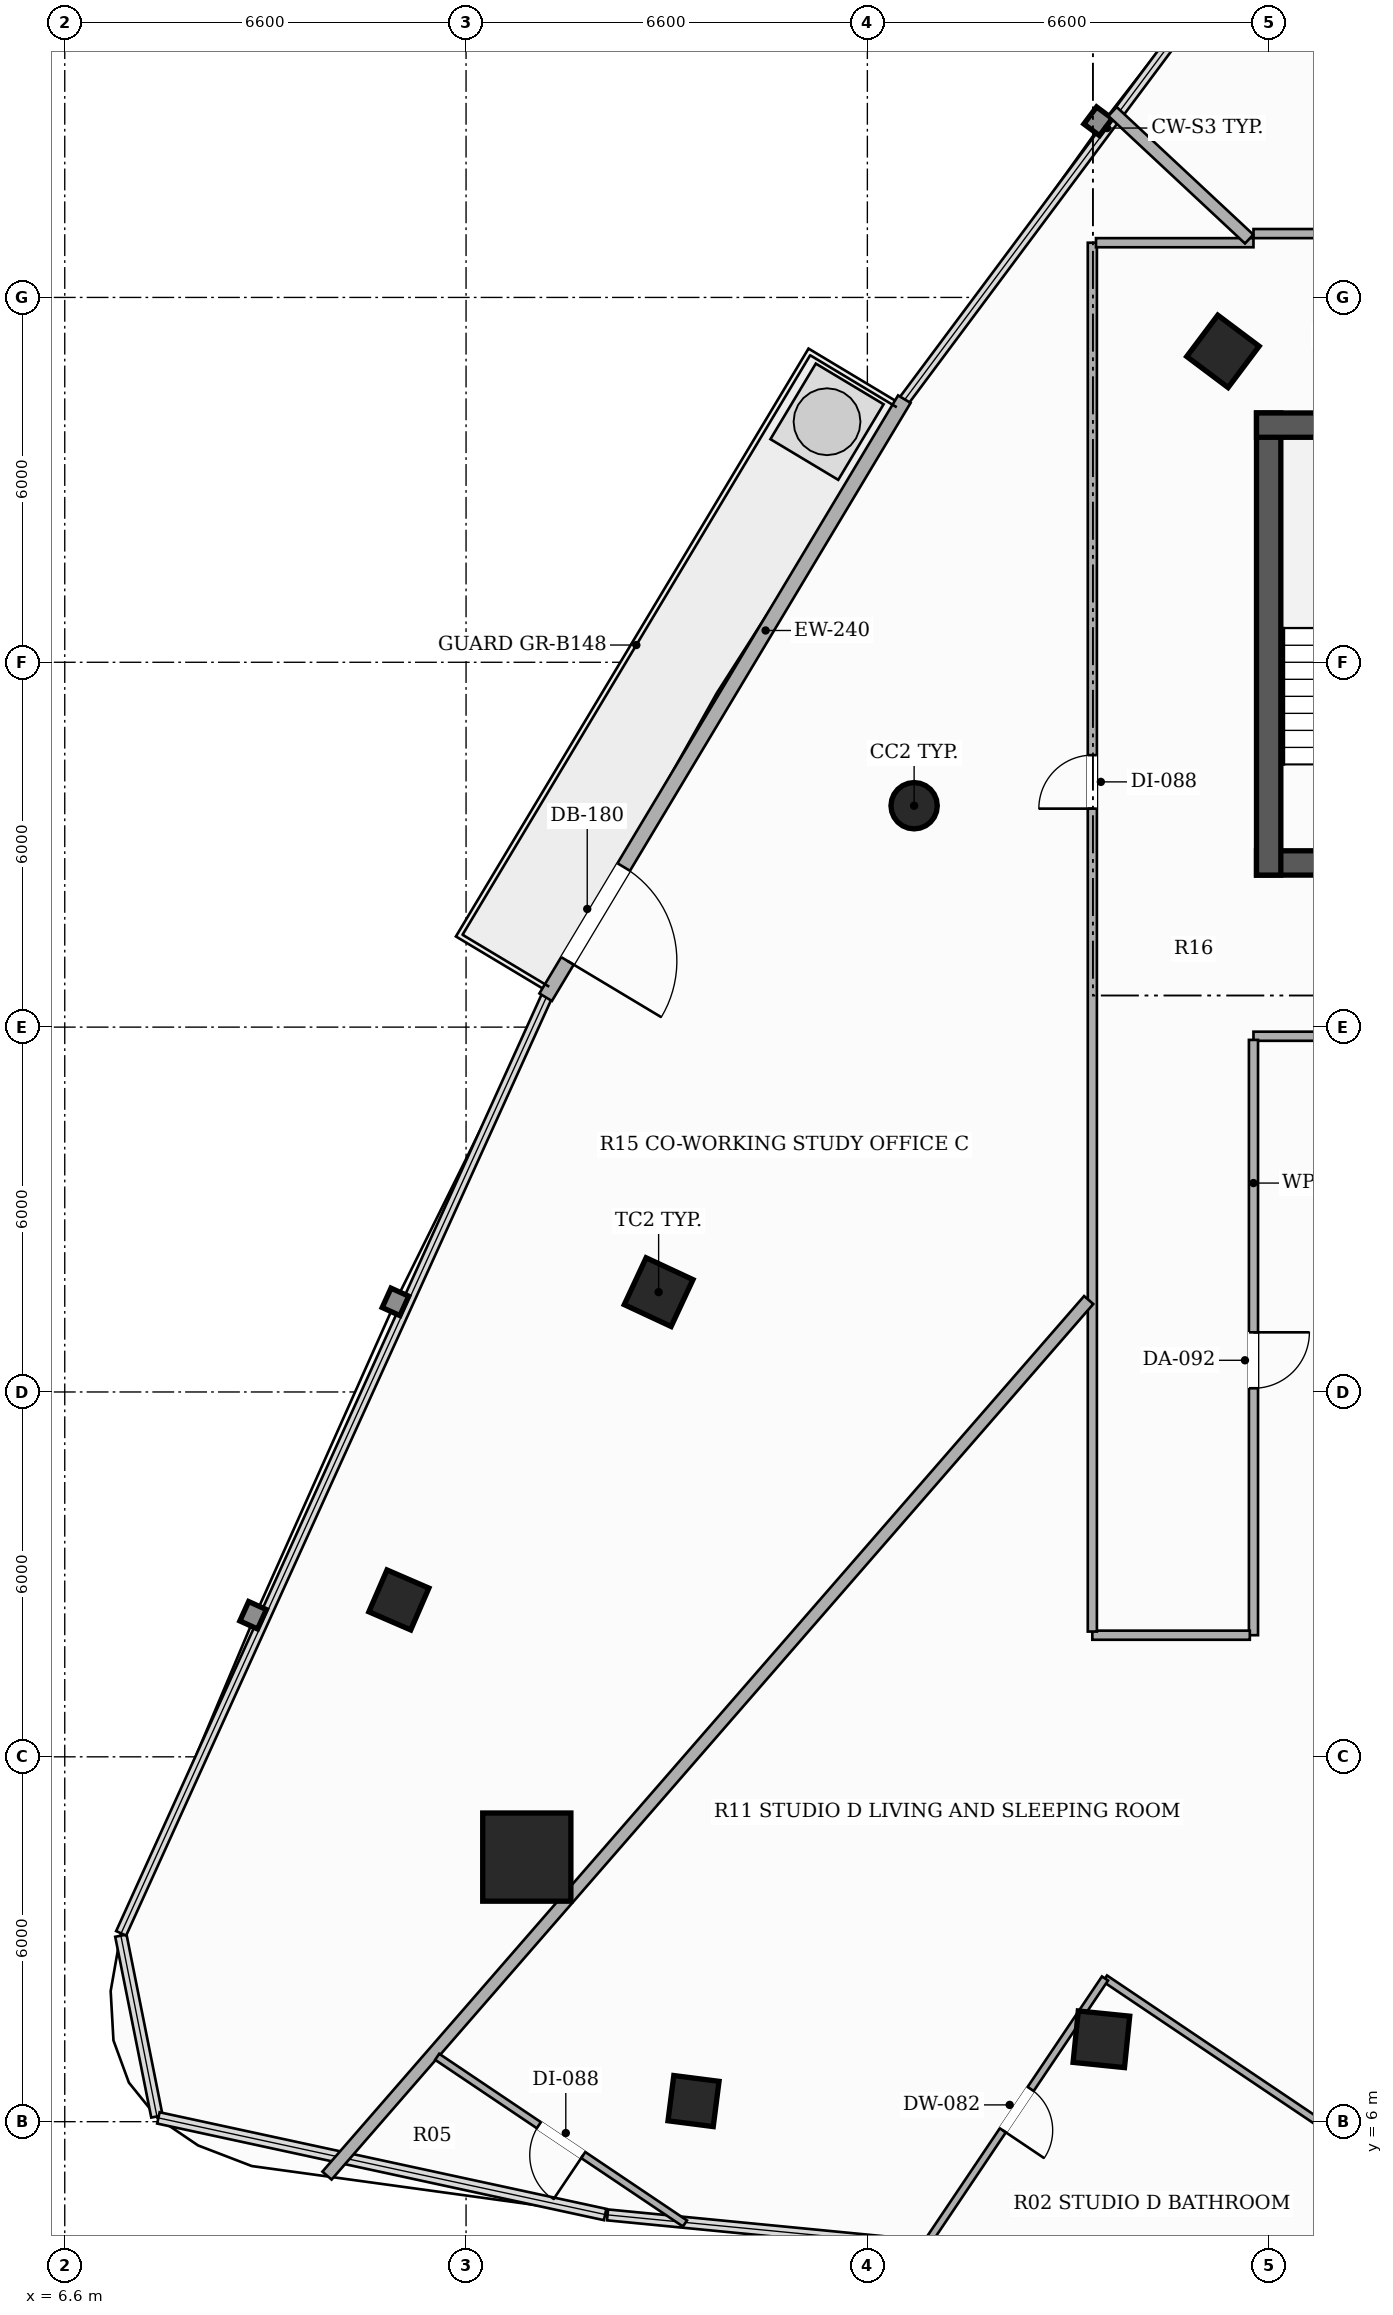
"""IFC4 building model, lengths in metres.
Left out: names, types, materials, properties, quantities, classifications, styles, units other than length and angle.
Written with IfcOpenShell. Run it as: python <this file> out.ifc"""

import sys

from ifc_helpers import new_model, si_unit, direction, frame, frame_2d, origin, origin_2d, place, context, subcontext, project, spatial, rectangle, hollow_rectangle, hollow_circle, extrude, element, fill, save


model = new_model("IFC4")
c1 = context("Model", 3, precision=1e-05, world=origin(), true_north=direction((0.0, 1.0)))
c2 = subcontext(c1, "Body", "Model", "MODEL_VIEW")
j1 = project(units=[si_unit("LENGTHUNIT", "METRE"), si_unit("PLANEANGLEUNIT", "RADIAN")], contexts=[c1])
p1 = place(None, origin())
s1 = spatial("IfcSite", under=j1, at=p1, CompositionType="ELEMENT")
p2 = place(p1, origin())
s2 = spatial("IfcBuilding", under=s1, at=p2, CompositionType="ELEMENT")
p3 = place(p2, frame((0.0, 0.0, 139.7)))
s3 = spatial("IfcBuildingStorey", under=s2, at=p3, CompositionType="ELEMENT", Elevation=139.7)
p4 = place(p3, frame((26.2, 26.7, 0.0), z_axis=(0.0, 0.0, 1.0), x_axis=(1.0, 0.0, 0.0)))
e1 = element("IfcWall", 1, at=p4, inside=s3, PredefinedType="SHEAR", context=c2, shape_type="SweptSolid", body=[
    extrude(rectangle(XDim=13.6, YDim=0.4, at=frame_2d((6.8, 0.0))), origin(), (0.0, 0.0, 1.0), 3.3),
])
p5 = place(p4, frame((4.35, 0.0, 0.0)))
e2 = element("IfcOpeningElement", 2, at=p5, cuts=e1, PredefinedType="OPENING", context=c2, shape_type="SweptSolid", body=[
    extrude(rectangle(XDim=1.05, YDim=2.15, at=frame_2d((0.525, 1.075))), frame((0.0, 0.21, 0.0), z_axis=(0.0, -1.0, 0.0), x_axis=(1.0, 0.0, 0.0)), (0.0, 0.0, 1.0), 0.42),
])
p6 = place(p4, frame((8.3, 0.0, 0.0)))
e3 = element("IfcOpeningElement", 3, at=p6, cuts=e1, PredefinedType="OPENING", context=c2, shape_type="SweptSolid", body=[
    extrude(rectangle(XDim=1.05, YDim=2.15, at=frame_2d((0.525, 1.075))), frame((0.0, 0.21, 0.0), z_axis=(0.0, -1.0, 0.0), x_axis=(1.0, 0.0, 0.0)), (0.0, 0.0, 1.0), 0.42),
])
p7 = place(p3, frame((26.4, 26.5, 0.0), z_axis=(0.0, 0.0, 1.0), x_axis=(0.0, 1.0, 0.0)))
e4 = element("IfcWall", 4, at=p7, inside=s3, PredefinedType="SHEAR", context=c2, shape_type="SweptSolid", body=[
    extrude(rectangle(XDim=7.6, YDim=0.4, at=frame_2d((3.8, 0.0))), origin(), (0.0, 0.0, 1.0), 3.3),
])
p8 = place(p3, frame((26.2, 33.9, 0.0), z_axis=(0.0, 0.0, 1.0), x_axis=(1.0, 0.0, 0.0)))
e5 = element("IfcWall", 5, at=p8, inside=s3, PredefinedType="SHEAR", context=c2, shape_type="SweptSolid", body=[
    extrude(rectangle(XDim=3.68, YDim=0.4, at=frame_2d((1.84, 0.0))), origin(), (0.0, 0.0, 1.0), 3.3),
])
p9 = place(p3, frame((14.199, 10.351, 0.0), z_axis=(0.0, 0.0, 1.0), x_axis=(1.0, 0.0, 0.0)))
e6 = element("IfcColumn", 6, at=p9, inside=s3, PredefinedType="COLUMN", context=c2, shape_type="SweptSolid", body=[
    extrude(hollow_rectangle(XDim=1.45, YDim=1.45, WallThickness=0.045, at=origin_2d()), origin(), (0.0, 0.0, 1.0), 3.3),
])
p10 = place(p3, frame((25.648, 35.113, 0.0), z_axis=(0.0, 0.0, 1.0), x_axis=(0.600420225326, 0.799684658487, 0.0)))
e7 = element("IfcColumn", 7, at=p10, inside=s3, PredefinedType="COLUMN", context=c2, shape_type="SweptSolid", body=[
    extrude(hollow_rectangle(XDim=0.85, YDim=0.85, WallThickness=0.028, at=origin_2d()), origin(), (0.0, 0.0, 1.0), 3.3),
])
p11 = place(p3, frame((20.569, 27.641, 0.0), z_axis=(0.0, 0.0, 1.0), x_axis=(1.0, 0.0, 0.0)))
e8 = element("IfcColumn", 8, at=p11, inside=s3, PredefinedType="COLUMN", context=c2, shape_type="SweptSolid", body=[
    extrude(hollow_circle(Radius=0.381, WallThickness=0.022, at=origin_2d()), origin(), (0.0, 0.0, 1.0), 3.3),
])
for number, where, z_axis, x_axis in (
    (9, (16.367, 19.642, 0.0), (0.0, 0.0, 1.0), (0.423, 0.906, 0.0)),
    (10, (23.649, 7.355, 0.0), (0.0, 0.0, 1.0), (-0.995, 0.101, 0.0)),
):
    element("IfcColumn", number, at=place(p3, frame(where, z_axis=z_axis, x_axis=x_axis)), inside=s3, PredefinedType="COLUMN", context=c2, shape_type="SweptSolid", body=[
        extrude(hollow_rectangle(XDim=0.85, YDim=0.85, WallThickness=0.028, at=origin_2d()), origin(), (0.0, 0.0, 1.0), 3.3),
    ])
for number, where, z_axis, x_axis in (
    (11, (12.095, 14.58, 0.0), (0.0, 0.0, 1.0), (0.397, 0.918, 0.0)),
    (12, (16.941, 6.339, 0.0), (0.0, 0.0, 1.0), (-0.992, 0.127, 0.0)),
):
    element("IfcColumn", number, at=place(p3, frame(where, z_axis=z_axis, x_axis=x_axis)), inside=s3, PredefinedType="COLUMN", context=c2, shape_type="SweptSolid", body=[
        extrude(hollow_rectangle(XDim=0.75, YDim=0.75, WallThickness=0.025, at=origin_2d()), origin(), (0.0, 0.0, 1.0), 3.3),
    ])
p12 = place(p3, frame((20.408, 34.327, 0.0), z_axis=(0.0, 0.0, 1.0), x_axis=(-0.514364263751, -0.857571807009, 0.0)))
e13 = element("IfcWall", 13, at=p12, inside=s3, PredefinedType="SOLIDWALL", context=c2, shape_type="SweptSolid", body=[
    extrude(rectangle(XDim=11.468, YDim=0.24, at=frame_2d((5.734, 0.0))), origin(), (0.0, 0.0, 1.0), 2.624),
])
p13 = place(p12, frame((8.972, 0.0, 0.0)))
e14 = element("IfcOpeningElement", 14, at=p13, cuts=e13, PredefinedType="OPENING", context=c2, shape_type="SweptSolid", body=[
    extrude(rectangle(XDim=1.8, YDim=2.2, at=frame_2d((0.9, 1.1))), frame((0.0, 0.13, 0.0), z_axis=(0.0, -1.0, 0.0), x_axis=(1.0, 0.0, 0.0)), (0.0, 0.0, 1.0), 0.26),
])
p14 = place(p3, frame((31.844, 23.85, 0.0), z_axis=(0.0, 0.0, 1.0), x_axis=(-1.0, 0.0, 0.0)))
e15 = element("IfcWall", 15, at=p14, inside=s3, PredefinedType="PARTITIONING", context=c2, shape_type="SweptSolid", body=[
    extrude(rectangle(XDim=5.694, YDim=0.15, at=frame_2d((2.847, 0.0))), origin(), (0.0, 0.0, 1.0), 2.721),
])
p15 = place(p3, frame((26.15, 23.79, 0.0), z_axis=(0.0, 0.0, 1.0), x_axis=(0.0, -1.0, 0.0)))
e16 = element("IfcWall", 16, at=p15, inside=s3, PredefinedType="PARTITIONING", context=c2, shape_type="SweptSolid", body=[
    extrude(rectangle(XDim=9.79, YDim=0.15, at=frame_2d((4.895, 0.0))), origin(), (0.0, 0.0, 1.0), 2.721),
])
p16 = place(p15, frame((4.809, 0.0, 0.0)))
e17 = element("IfcOpeningElement", 17, at=p16, cuts=e16, PredefinedType="OPENING", context=c2, shape_type="SweptSolid", body=[
    extrude(rectangle(XDim=0.92, YDim=2.15, at=frame_2d((0.46, 1.075))), frame((0.0, 0.085, 0.0), z_axis=(0.0, -1.0, 0.0), x_axis=(1.0, 0.0, 0.0)), (0.0, 0.0, 1.0), 0.17),
])
p17 = place(p3, frame((26.09, 14.0, 0.0), z_axis=(0.0, 0.0, 1.0), x_axis=(-1.0, 0.0, 0.0)))
e18 = element("IfcWall", 18, at=p17, inside=s3, PredefinedType="PARTITIONING", context=c2, shape_type="SweptSolid", body=[
    extrude(rectangle(XDim=2.59, YDim=0.15, at=frame_2d((1.295, 0.0))), origin(), (0.0, 0.0, 1.0), 2.721),
])
p18 = place(p3, frame((23.5, 14.06, 0.0), z_axis=(0.0, 0.0, 1.0), x_axis=(0.0, 1.0, 0.0)))
e19 = element("IfcWall", 19, at=p18, inside=s3, PredefinedType="PARTITIONING", context=c2, shape_type="SweptSolid", body=[
    extrude(rectangle(XDim=22.84, YDim=0.15, at=frame_2d((11.42, 0.0))), origin(), (0.0, 0.0, 1.0), 2.413),
])
p19 = place(p18, frame((13.533, 0.0, 0.0)))
e20 = element("IfcOpeningElement", 20, at=p19, cuts=e19, PredefinedType="OPENING", context=c2, shape_type="SweptSolid", body=[
    extrude(rectangle(XDim=0.88, YDim=2.1, at=frame_2d((0.44, 1.05))), frame((0.0, 0.085, 0.0), z_axis=(0.0, -1.0, 0.0), x_axis=(1.0, 0.0, 0.0)), (0.0, 0.0, 1.0), 0.17),
])
p20 = place(p3, frame((23.56, 36.9, 0.0), z_axis=(0.0, 0.0, 1.0), x_axis=(1.0, 0.0, 0.0)))
e21 = element("IfcWall", 21, at=p20, inside=s3, PredefinedType="PARTITIONING", context=c2, shape_type="SweptSolid", body=[
    extrude(rectangle(XDim=2.59, YDim=0.15, at=frame_2d((1.295, 0.0))), origin(), (0.0, 0.0, 1.0), 2.413),
])
p21 = place(p3, frame((26.15, 37.05, 0.0), z_axis=(0.0, 0.0, 1.0), x_axis=(1.0, 0.0, 0.0)))
e22 = element("IfcWall", 22, at=p21, inside=s3, PredefinedType="PARTITIONING", context=c2, shape_type="SweptSolid", body=[
    extrude(rectangle(XDim=2.0, YDim=0.15, at=frame_2d((1.0, 0.0))), origin(), (0.0, 0.0, 1.0), 2.413),
])
p22 = place(p3, frame((26.079, 36.96, 0.0), z_axis=(0.0, 0.0, 1.0), x_axis=(-0.730912649308, 0.682471024354, 0.0)))
e23 = element("IfcWall", 23, at=p22, inside=s3, PredefinedType="PARTITIONING", context=c2, shape_type="SweptSolid", body=[
    extrude(rectangle(XDim=3.074, YDim=0.2, at=frame_2d((1.537, 0.0))), origin(), (0.0, 0.0, 1.0), 2.413),
])
p23 = place(p3, frame((23.44, 19.512, 0.0), z_axis=(0.0, 0.0, 1.0), x_axis=(-0.656359216658, -0.754448526215, 0.0)))
e24 = element("IfcWall", 24, at=p23, inside=s3, PredefinedType="PARTITIONING", context=c2, shape_type="SweptSolid", body=[
    extrude(rectangle(XDim=19.085, YDim=0.2, at=frame_2d((9.543, 0.0))), origin(), (0.0, 0.0, 1.0), 2.413),
])
p24 = place(p3, frame((27.879, 5.548, 0.0), z_axis=(0.0, 0.0, 1.0), x_axis=(-0.829629274352, 0.558314666777, 0.0)))
e25 = element("IfcWall", 25, at=p24, inside=s3, PredefinedType="PARTITIONING", context=c2, shape_type="SweptSolid", body=[
    extrude(rectangle(XDim=5.027, YDim=0.12, at=frame_2d((2.514, 0.0))), origin(), (0.0, 0.0, 1.0), 2.413),
])
p25 = place(p3, frame((23.708, 8.355, 0.0), z_axis=(0.0, 0.0, 1.0), x_axis=(-0.55815233332, -0.829738496642, 0.0)))
e26 = element("IfcWall", 26, at=p25, inside=s3, PredefinedType="PARTITIONING", context=c2, shape_type="SweptSolid", body=[
    extrude(rectangle(XDim=5.395, YDim=0.12, at=frame_2d((2.697, 0.0))), origin(), (0.0, 0.0, 1.0), 2.413),
])
p26 = place(p25, frame((2.19, 0.0, 0.0)))
e27 = element("IfcOpeningElement", 27, at=p26, cuts=e26, PredefinedType="OPENING", context=c2, shape_type="SweptSolid", body=[
    extrude(rectangle(XDim=0.82, YDim=2.1, at=frame_2d((0.41, 1.05))), frame((0.0, 0.07, 0.0), z_axis=(0.0, -1.0, 0.0), x_axis=(1.0, 0.0, 0.0)), (0.0, 0.0, 1.0), 0.14),
])
p27 = place(p3, frame((16.8, 4.326, 0.0), z_axis=(0.0, 0.0, 1.0), x_axis=(-0.829756434678, 0.558125666056, 0.0)))
e28 = element("IfcWall", 28, at=p27, inside=s3, PredefinedType="PARTITIONING", context=c2, shape_type="SweptSolid", body=[
    extrude(rectangle(XDim=4.911, YDim=0.12, at=frame_2d((2.456, 0.0))), origin(), (0.0, 0.0, 1.0), 3.06),
])
p28 = place(p27, frame((2.016, 0.0, 0.0)))
e29 = element("IfcOpeningElement", 29, at=p28, cuts=e28, PredefinedType="OPENING", context=c2, shape_type="SweptSolid", body=[
    extrude(rectangle(XDim=0.88, YDim=2.1, at=frame_2d((0.44, 1.05))), frame((0.0, 0.07, 0.0), z_axis=(0.0, -1.0, 0.0), x_axis=(1.0, 0.0, 0.0)), (0.0, 0.0, 1.0), 0.14),
])
p29 = place(p13, origin())
e30 = element("IfcDoor", 30, at=p29, inside=s3, OperationType="SINGLE_SWING_RIGHT", PredefinedType="DOOR", context=c2, shape_type="SweptSolid", body=[
    extrude(rectangle(XDim=1.8, YDim=2.2, at=frame_2d((0.9, 1.1))), frame((0.0, 0.025, 0.0), z_axis=(0.0, -1.0, 0.0), x_axis=(1.0, 0.0, 0.0)), (0.0, 0.0, 1.0), 0.05),
])
fill(e14, e30)
p30 = place(p19, origin())
e31 = element("IfcDoor", 31, at=p30, inside=s3, OperationType="SINGLE_SWING_LEFT", PredefinedType="DOOR", context=c2, shape_type="SweptSolid", body=[
    extrude(rectangle(XDim=0.88, YDim=2.1, at=frame_2d((0.44, 1.05))), frame((0.0, 0.025, 0.0), z_axis=(0.0, -1.0, 0.0), x_axis=(1.0, 0.0, 0.0)), (0.0, 0.0, 1.0), 0.05),
])
fill(e20, e31)
p31 = place(p16, origin())
e32 = element("IfcDoor", 32, at=p31, inside=s3, OperationType="SINGLE_SWING_LEFT", PredefinedType="DOOR", context=c2, shape_type="SweptSolid", body=[
    extrude(rectangle(XDim=0.92, YDim=2.15, at=frame_2d((0.46, 1.075))), frame((0.0, 0.025, 0.0), z_axis=(0.0, -1.0, 0.0), x_axis=(1.0, 0.0, 0.0)), (0.0, 0.0, 1.0), 0.05),
])
fill(e17, e32)
p32 = place(p26, origin())
e33 = element("IfcDoor", 33, at=p32, inside=s3, OperationType="SINGLE_SWING_RIGHT", PredefinedType="DOOR", context=c2, shape_type="SweptSolid", body=[
    extrude(rectangle(XDim=0.82, YDim=2.1, at=frame_2d((0.41, 1.05))), frame((0.0, 0.025, 0.0), z_axis=(0.0, -1.0, 0.0), x_axis=(1.0, 0.0, 0.0)), (0.0, 0.0, 1.0), 0.05),
])
fill(e27, e33)
p33 = place(p28, origin())
e34 = element("IfcDoor", 34, at=p33, inside=s3, OperationType="SINGLE_SWING_LEFT", PredefinedType="DOOR", context=c2, shape_type="SweptSolid", body=[
    extrude(rectangle(XDim=0.88, YDim=2.1, at=frame_2d((0.44, 1.05))), frame((0.0, 0.025, 0.0), z_axis=(0.0, -1.0, 0.0), x_axis=(1.0, 0.0, 0.0)), (0.0, 0.0, 1.0), 0.05),
])
fill(e29, e34)
save(model, sys.argv[1])
